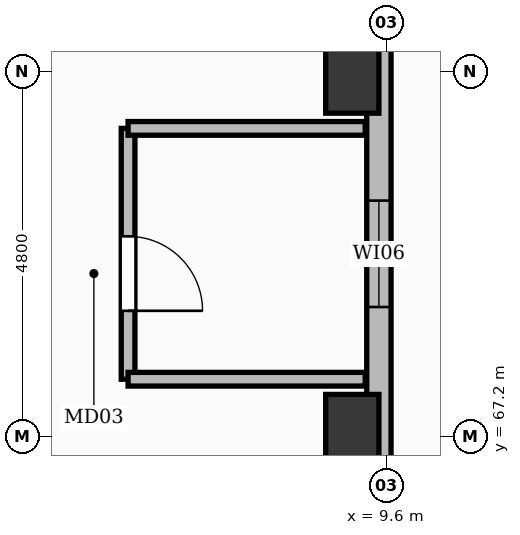
"""IFC4 building model, lengths in metres.
Left out: names, types, materials, properties, quantities, classifications, styles, units other than length and angle.
Written with IfcOpenShell. Run it as: python <this file> out.ifc"""

import sys

from ifc_helpers import new_model, si_unit, direction, frame, frame_2d, origin, origin_2d, place, context, subcontext, project, spatial, rectangle, extrude, element, fill, save


model = new_model("IFC4")
c1 = context("Model", 3, precision=1e-05, world=origin(), true_north=direction((0.0, 1.0)))
c2 = subcontext(c1, "Body", "Model", "MODEL_VIEW")
j1 = project(units=[si_unit("LENGTHUNIT", "METRE"), si_unit("PLANEANGLEUNIT", "RADIAN")], contexts=[c1])
p1 = place(None, origin())
s1 = spatial("IfcSite", under=j1, at=p1, CompositionType="ELEMENT")
p2 = place(p1, origin())
s2 = spatial("IfcBuilding", under=s1, at=p2, CompositionType="ELEMENT")
p3 = place(p2, frame((0.0, 0.0, 11.4)))
s3 = spatial("IfcBuildingStorey", under=s2, at=p3, CompositionType="ELEMENT", Elevation=11.4)
for number, where, z_axis, x_axis in (
    (1, (9.15, 67.2, 0.0), (0.0, 0.0, 1.0), (1.0, 0.0, 0.0)),
    (2, (9.15, 72.0, 0.0), (0.0, 0.0, 1.0), (1.0, 0.0, 0.0)),
):
    element("IfcColumn", number, at=place(p3, frame(where, z_axis=z_axis, x_axis=x_axis)), inside=s3, PredefinedType="COLUMN", context=c2, shape_type="SweptSolid", body=[
        extrude(rectangle(XDim=0.7, YDim=1.1, at=origin_2d()), origin(), (0.0, 0.0, 1.0), 4.8),
    ])
p4 = place(p3, frame((9.5, 34.2, 0.0), z_axis=(0.0, 0.0, 1.0), x_axis=(0.0, 1.0, 0.0)))
e3 = element("IfcWall", 3, at=p4, inside=s3, PredefinedType="SOLIDWALL", context=c2, shape_type="SweptSolid", body=[
    extrude(rectangle(XDim=51.6, YDim=0.32, at=frame_2d((25.8, 0.0))), origin(), (0.0, 0.0, 1.0), 3.692),
])
p5 = place(p4, frame((0.8, 0.0, 0.0)))
e4 = element("IfcOpeningElement", 4, at=p5, cuts=e3, PredefinedType="OPENING", context=c2, shape_type="SweptSolid", body=[
    extrude(rectangle(XDim=2.4, YDim=2.5, at=frame_2d((1.2, 1.25))), frame((0.0, 0.172, 0.0), z_axis=(0.0, -1.0, 0.0), x_axis=(1.0, 0.0, 0.0)), (0.0, 0.0, 1.0), 0.344),
])
p6 = place(p4, frame((11.325, 0.0, 0.95)))
e5 = element("IfcOpeningElement", 5, at=p6, cuts=e3, PredefinedType="OPENING", context=c2, shape_type="SweptSolid", body=[
    extrude(rectangle(XDim=1.4, YDim=1.1, at=frame_2d((0.7, 0.55))), frame((0.0, 0.172, 0.0), z_axis=(0.0, -1.0, 0.0), x_axis=(1.0, 0.0, 0.0)), (0.0, 0.0, 1.0), 0.344),
])
p7 = place(p4, frame((15.5, 0.0, 0.95)))
e6 = element("IfcOpeningElement", 6, at=p7, cuts=e3, PredefinedType="OPENING", context=c2, shape_type="SweptSolid", body=[
    extrude(rectangle(XDim=1.4, YDim=1.1, at=frame_2d((0.7, 0.55))), frame((0.0, 0.172, 0.0), z_axis=(0.0, -1.0, 0.0), x_axis=(1.0, 0.0, 0.0)), (0.0, 0.0, 1.0), 0.344),
])
p8 = place(p4, frame((20.3, 0.0, 0.95)))
e7 = element("IfcOpeningElement", 7, at=p8, cuts=e3, PredefinedType="OPENING", context=c2, shape_type="SweptSolid", body=[
    extrude(rectangle(XDim=1.4, YDim=1.1, at=frame_2d((0.7, 0.55))), frame((0.0, 0.172, 0.0), z_axis=(0.0, -1.0, 0.0), x_axis=(1.0, 0.0, 0.0)), (0.0, 0.0, 1.0), 0.344),
])
p9 = place(p4, frame((25.1, 0.0, 0.95)))
e8 = element("IfcOpeningElement", 8, at=p9, cuts=e3, PredefinedType="OPENING", context=c2, shape_type="SweptSolid", body=[
    extrude(rectangle(XDim=1.4, YDim=1.1, at=frame_2d((0.7, 0.55))), frame((0.0, 0.172, 0.0), z_axis=(0.0, -1.0, 0.0), x_axis=(1.0, 0.0, 0.0)), (0.0, 0.0, 1.0), 0.344),
])
p10 = place(p4, frame((29.9, 0.0, 0.95)))
e9 = element("IfcOpeningElement", 9, at=p10, cuts=e3, PredefinedType="OPENING", context=c2, shape_type="SweptSolid", body=[
    extrude(rectangle(XDim=1.4, YDim=1.1, at=frame_2d((0.7, 0.55))), frame((0.0, 0.172, 0.0), z_axis=(0.0, -1.0, 0.0), x_axis=(1.0, 0.0, 0.0)), (0.0, 0.0, 1.0), 0.344),
])
p11 = place(p4, frame((34.7, 0.0, 0.95)))
e10 = element("IfcOpeningElement", 10, at=p11, cuts=e3, PredefinedType="OPENING", context=c2, shape_type="SweptSolid", body=[
    extrude(rectangle(XDim=1.4, YDim=1.2, at=frame_2d((0.7, 0.6))), frame((0.0, 0.172, 0.0), z_axis=(0.0, -1.0, 0.0), x_axis=(1.0, 0.0, 0.0)), (0.0, 0.0, 1.0), 0.344),
])
p12 = place(p3, frame((6.2, 67.95, 0.0), z_axis=(0.0, 0.0, 1.0), x_axis=(0.0, 1.0, 0.0)))
e11 = element("IfcWall", 11, at=p12, inside=s3, PredefinedType="PARTITIONING", context=c2, shape_type="SweptSolid", body=[
    extrude(rectangle(XDim=3.3, YDim=0.18, at=frame_2d((1.65, 0.0))), origin(), (0.0, 0.0, 1.0), 4.42),
])
p13 = place(p12, frame((0.9, 0.0, 0.0)))
e12 = element("IfcOpeningElement", 12, at=p13, cuts=e11, PredefinedType="OPENING", context=c2, shape_type="SweptSolid", body=[
    extrude(rectangle(XDim=0.98, YDim=2.15, at=frame_2d((0.49, 1.075))), frame((0.0, 0.102, 0.0), z_axis=(0.0, -1.0, 0.0), x_axis=(1.0, 0.0, 0.0)), (0.0, 0.0, 1.0), 0.204),
])
for number, where, z_axis, x_axis in (
    (13, (6.2, 67.95, 0.0), (0.0, 0.0, 1.0), (1.0, 0.0, 0.0)),
    (14, (6.2, 71.25, 0.0), (0.0, 0.0, 1.0), (1.0, 0.0, 0.0)),
):
    element("IfcWall", number, at=place(p3, frame(where, z_axis=z_axis, x_axis=x_axis)), inside=s3, PredefinedType="PARTITIONING", context=c2, shape_type="SweptSolid", body=[
        extrude(rectangle(XDim=3.12, YDim=0.18, at=frame_2d((1.56, 0.0))), origin(), (0.0, 0.0, 1.0), 3.692),
    ])
p14 = place(p13, frame((0.98, 0.0, 0.0), z_axis=(0.0, 0.0, 1.0), x_axis=(-1.0, 0.0, 0.0)))
e15 = element("IfcDoor", 15, at=p14, inside=s3, OperationType="SINGLE_SWING_LEFT", PredefinedType="DOOR", context=c2, shape_type="SweptSolid", body=[
    extrude(rectangle(XDim=0.98, YDim=2.15, at=frame_2d((0.49, 1.075))), frame((0.0, 0.025, 0.0), z_axis=(0.0, -1.0, 0.0), x_axis=(1.0, 0.0, 0.0)), (0.0, 0.0, 1.0), 0.05),
])
fill(e12, e15)
p15 = place(p11, origin())
e16 = element("IfcWindow", 16, at=p15, inside=s3, PartitioningType="SINGLE_PANEL", PredefinedType="WINDOW", context=c2, shape_type="SweptSolid", body=[
    extrude(rectangle(XDim=1.4, YDim=1.2, at=frame_2d((0.7, 0.6))), frame((0.0, 0.03, 0.0), z_axis=(0.0, -1.0, 0.0), x_axis=(1.0, 0.0, 0.0)), (0.0, 0.0, 1.0), 0.06),
])
fill(e10, e16)
save(model, sys.argv[1])
